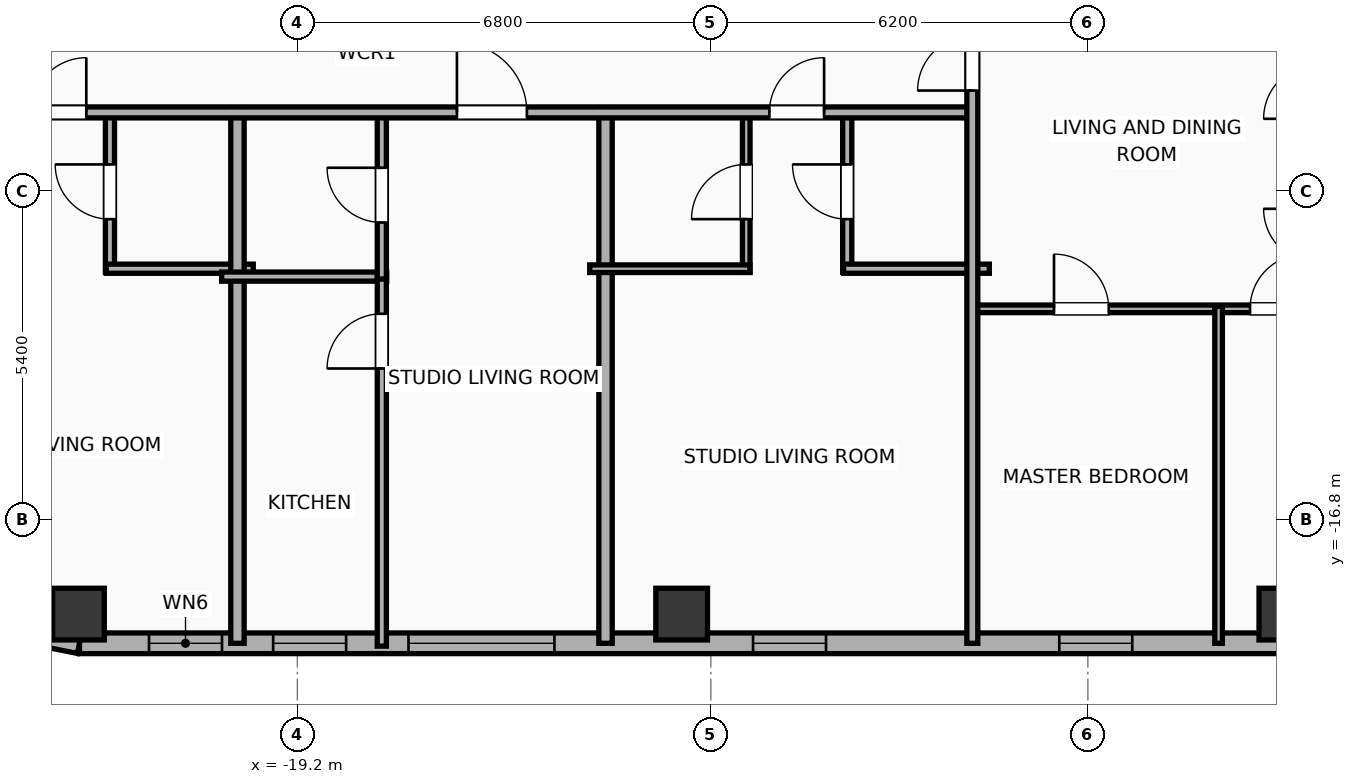
"""IFC4 building model, lengths in metres.
Left out: names, types, materials, properties, quantities, classifications, styles, units other than length and angle.
Written with IfcOpenShell. Run it as: python <this file> out.ifc"""

import sys

from ifc_helpers import new_model, si_unit, direction, frame, frame_2d, origin, origin_2d, place, context, subcontext, project, spatial, rectangle, hollow_rectangle, extrude, element, fill, save


model = new_model("IFC4")
c1 = context("Model", 3, precision=1e-05, world=origin(), true_north=direction((0.0, 1.0)))
c2 = subcontext(c1, "Body", "Model", "MODEL_VIEW")
j1 = project(units=[si_unit("LENGTHUNIT", "METRE"), si_unit("PLANEANGLEUNIT", "RADIAN")], contexts=[c1])
p1 = place(None, origin())
s1 = spatial("IfcSite", under=j1, at=p1, CompositionType="ELEMENT")
p2 = place(p1, origin())
s2 = spatial("IfcBuilding", under=s1, at=p2, CompositionType="ELEMENT")
p3 = place(p2, frame((0.0, 0.0, 235.3)))
s3 = spatial("IfcBuildingStorey", under=s2, at=p3, CompositionType="ELEMENT", Elevation=235.3)
for number, where, z_axis, x_axis in (
    (1, (-22.8, -18.35, 0.0), (0.0, 0.0, 1.0), (1.0, 0.0, 0.0)),
    (2, (-12.88, -18.35, 0.0), (0.0, 0.0, 1.0), (1.0, 0.0, 0.0)),
    (3, (-2.96, -18.35, 0.0), (0.0, 0.0, 1.0), (1.0, 0.0, 0.0)),
):
    element("IfcColumn", number, at=place(p3, frame(where, z_axis=z_axis, x_axis=x_axis)), inside=s3, PredefinedType="COLUMN", context=c2, shape_type="SweptSolid", body=[
        extrude(hollow_rectangle(XDim=0.85, YDim=0.85, WallThickness=0.028, at=origin_2d()), origin(), (0.0, 0.0, 1.0), 3.9),
    ])
p4 = place(p3, frame((26.783, -18.83, 0.0), z_axis=(0.0, 0.0, 1.0), x_axis=(-1.0, 0.0, 0.0)))
e4 = element("IfcWall", 4, at=p4, inside=s3, PredefinedType="ELEMENTEDWALL", context=c2, shape_type="SweptSolid", body=[
    extrude(rectangle(XDim=49.566, YDim=0.34, at=frame_2d((24.783, 0.0))), origin(), (0.0, 0.0, 1.0), 3.65),
])
p5 = place(p4, frame((23.583, 0.0, 0.75)))
e5 = element("IfcOpeningElement", 5, at=p5, cuts=e4, PredefinedType="OPENING", context=c2, shape_type="SweptSolid", body=[
    extrude(rectangle(XDim=2.4, YDim=2.1, at=frame_2d((1.2, 1.05))), frame((0.0, 0.18, 0.0), z_axis=(0.0, -1.0, 0.0), x_axis=(1.0, 0.0, 0.0)), (0.0, 0.0, 1.0), 0.36),
])
p6 = place(p4, frame((41.756, 0.0, 0.75)))
e6 = element("IfcOpeningElement", 6, at=p6, cuts=e4, PredefinedType="OPENING", context=c2, shape_type="SweptSolid", body=[
    extrude(rectangle(XDim=2.4, YDim=2.1, at=frame_2d((1.2, 1.05))), frame((0.0, 0.18, 0.0), z_axis=(0.0, -1.0, 0.0), x_axis=(1.0, 0.0, 0.0)), (0.0, 0.0, 1.0), 0.36),
])
p7 = place(p4, frame((47.222, 0.0, 0.75)))
e7 = element("IfcOpeningElement", 7, at=p7, cuts=e4, PredefinedType="OPENING", context=c2, shape_type="SweptSolid", body=[
    extrude(rectangle(XDim=1.2, YDim=2.05, at=frame_2d((0.6, 1.025))), frame((0.0, 0.18, 0.0), z_axis=(0.0, -1.0, 0.0), x_axis=(1.0, 0.0, 0.0)), (0.0, 0.0, 1.0), 0.36),
])
p8 = place(p4, frame((45.181, 0.0, 0.75)))
e8 = element("IfcOpeningElement", 8, at=p8, cuts=e4, PredefinedType="OPENING", context=c2, shape_type="SweptSolid", body=[
    extrude(rectangle(XDim=1.2, YDim=2.05, at=frame_2d((0.6, 1.025))), frame((0.0, 0.18, 0.0), z_axis=(0.0, -1.0, 0.0), x_axis=(1.0, 0.0, 0.0)), (0.0, 0.0, 1.0), 0.36),
])
p9 = place(p4, frame((37.289, 0.0, 0.75)))
e9 = element("IfcOpeningElement", 9, at=p9, cuts=e4, PredefinedType="OPENING", context=c2, shape_type="SweptSolid", body=[
    extrude(rectangle(XDim=1.2, YDim=2.05, at=frame_2d((0.6, 1.025))), frame((0.0, 0.18, 0.0), z_axis=(0.0, -1.0, 0.0), x_axis=(1.0, 0.0, 0.0)), (0.0, 0.0, 1.0), 0.36),
])
p10 = place(p4, frame((15.715, 0.0, 0.75)))
e10 = element("IfcOpeningElement", 10, at=p10, cuts=e4, PredefinedType="OPENING", context=c2, shape_type="SweptSolid", body=[
    extrude(rectangle(XDim=1.2, YDim=2.05, at=frame_2d((0.6, 1.025))), frame((0.0, 0.18, 0.0), z_axis=(0.0, -1.0, 0.0), x_axis=(1.0, 0.0, 0.0)), (0.0, 0.0, 1.0), 0.36),
])
p11 = place(p4, frame((12.022, 0.0, 0.75)))
e11 = element("IfcOpeningElement", 11, at=p11, cuts=e4, PredefinedType="OPENING", context=c2, shape_type="SweptSolid", body=[
    extrude(rectangle(XDim=1.2, YDim=2.05, at=frame_2d((0.6, 1.025))), frame((0.0, 0.18, 0.0), z_axis=(0.0, -1.0, 0.0), x_axis=(1.0, 0.0, 0.0)), (0.0, 0.0, 1.0), 0.36),
])
p12 = place(p4, frame((8.01, 0.0, 0.75)))
e12 = element("IfcOpeningElement", 12, at=p12, cuts=e4, PredefinedType="OPENING", context=c2, shape_type="SweptSolid", body=[
    extrude(rectangle(XDim=1.2, YDim=2.05, at=frame_2d((0.6, 1.025))), frame((0.0, 0.18, 0.0), z_axis=(0.0, -1.0, 0.0), x_axis=(1.0, 0.0, 0.0)), (0.0, 0.0, 1.0), 0.36),
])
p13 = place(p4, frame((5.037, 0.0, 0.75)))
e13 = element("IfcOpeningElement", 13, at=p13, cuts=e4, PredefinedType="OPENING", context=c2, shape_type="SweptSolid", body=[
    extrude(rectangle(XDim=1.2, YDim=2.05, at=frame_2d((0.6, 1.025))), frame((0.0, 0.18, 0.0), z_axis=(0.0, -1.0, 0.0), x_axis=(1.0, 0.0, 0.0)), (0.0, 0.0, 1.0), 0.36),
])
p14 = place(p4, frame((1.811, 0.0, 0.75)))
e14 = element("IfcOpeningElement", 14, at=p14, cuts=e4, PredefinedType="OPENING", context=c2, shape_type="SweptSolid", body=[
    extrude(rectangle(XDim=1.2, YDim=2.05, at=frame_2d((0.6, 1.025))), frame((0.0, 0.18, 0.0), z_axis=(0.0, -1.0, 0.0), x_axis=(1.0, 0.0, 0.0)), (0.0, 0.0, 1.0), 0.36),
])
p15 = place(p4, frame((32.253, 0.0, 0.75)))
e15 = element("IfcOpeningElement", 15, at=p15, cuts=e4, PredefinedType="OPENING", context=c2, shape_type="SweptSolid", body=[
    extrude(rectangle(XDim=1.2, YDim=2.05, at=frame_2d((0.6, 1.025))), frame((0.0, 0.18, 0.0), z_axis=(0.0, -1.0, 0.0), x_axis=(1.0, 0.0, 0.0)), (0.0, 0.0, 1.0), 0.36),
])
p16 = place(p4, frame((27.853, 0.0, 0.75)))
e16 = element("IfcOpeningElement", 16, at=p16, cuts=e4, PredefinedType="OPENING", context=c2, shape_type="SweptSolid", body=[
    extrude(rectangle(XDim=1.2, YDim=2.05, at=frame_2d((0.6, 1.025))), frame((0.0, 0.18, 0.0), z_axis=(0.0, -1.0, 0.0), x_axis=(1.0, 0.0, 0.0)), (0.0, 0.0, 1.0), 0.36),
])
p17 = place(p4, frame((20.473, 0.0, 0.75)))
e17 = element("IfcOpeningElement", 17, at=p17, cuts=e4, PredefinedType="OPENING", context=c2, shape_type="SweptSolid", body=[
    extrude(rectangle(XDim=1.2, YDim=2.05, at=frame_2d((0.6, 1.025))), frame((0.0, 0.18, 0.0), z_axis=(0.0, -1.0, 0.0), x_axis=(1.0, 0.0, 0.0)), (0.0, 0.0, 1.0), 0.36),
])
p18 = place(p3, frame((-22.783, -18.83, 0.0), z_axis=(0.0, 0.0, 1.0), x_axis=(-0.980788153188, 0.195075878998, 0.0)))
e18 = element("IfcWall", 18, at=p18, inside=s3, PredefinedType="ELEMENTEDWALL", context=c2, shape_type="SweptSolid", body=[
    extrude(rectangle(XDim=1.354, YDim=0.34, at=frame_2d((0.677, 0.0))), origin(), (0.0, 0.0, 1.0), 3.65),
])
p19 = place(p3, frame((-22.282, -12.73, 0.0), z_axis=(0.0, 0.0, 1.0), x_axis=(0.0, 1.0, 0.0)))
e19 = element("IfcWall", 19, at=p19, inside=s3, PredefinedType="PLUMBINGWALL", context=c2, shape_type="SweptSolid", body=[
    extrude(rectangle(XDim=2.65, YDim=0.15, at=frame_2d((1.325, 0.0))), origin(), (0.0, 0.0, 1.0), 3.65),
])
p20 = place(p19, frame((0.875, 0.0, 0.0)))
e20 = element("IfcOpeningElement", 20, at=p20, cuts=e19, PredefinedType="OPENING", context=c2, shape_type="SweptSolid", body=[
    extrude(rectangle(XDim=0.9, YDim=2.05, at=frame_2d((0.45, 1.025))), frame((0.0, 0.085, 0.0), z_axis=(0.0, -1.0, 0.0), x_axis=(1.0, 0.0, 0.0)), (0.0, 0.0, 1.0), 0.17),
])
p21 = place(p3, frame((-22.342, -12.67, 0.0), z_axis=(0.0, 0.0, 1.0), x_axis=(1.0, 0.0, 0.0)))
e21 = element("IfcWall", 21, at=p21, inside=s3, PredefinedType="PLUMBINGWALL", context=c2, shape_type="SweptSolid", body=[
    extrude(rectangle(XDim=2.417, YDim=0.15, at=frame_2d((1.208, 0.0))), origin(), (0.0, 0.0, 1.0), 3.65),
])
p22 = place(p3, frame((-20.185, -18.83, 0.0), z_axis=(0.0, 0.0, 1.0), x_axis=(0.0, 1.0, 0.0)))
e22 = element("IfcWall", 22, at=p22, inside=s3, PredefinedType="PARTITIONING", context=c2, shape_type="SweptSolid", body=[
    extrude(rectangle(XDim=8.81, YDim=0.22, at=frame_2d((4.405, 0.0))), origin(), (0.0, 0.0, 1.0), 3.09),
])
p23 = place(p3, frame((-20.445, -12.8, 0.0), z_axis=(0.0, 0.0, 1.0), x_axis=(1.0, 0.0, 0.0)))
e23 = element("IfcWall", 23, at=p23, inside=s3, PredefinedType="PLUMBINGWALL", context=c2, shape_type="SweptSolid", body=[
    extrude(rectangle(XDim=2.714, YDim=0.15, at=frame_2d((1.357, 0.0))), origin(), (0.0, 0.0, 1.0), 3.65),
])
p24 = place(p3, frame((-17.811, -18.877, 0.0), z_axis=(0.0, 0.0, 1.0), x_axis=(0.0, 1.0, 0.0)))
e24 = element("IfcWall", 24, at=p24, inside=s3, PredefinedType="PLUMBINGWALL", context=c2, shape_type="SweptSolid", body=[
    extrude(rectangle(XDim=6.117, YDim=0.15, at=frame_2d((3.058, 0.0))), origin(), (0.0, 0.0, 1.0), 3.65),
])
p25 = place(p24, frame((4.566, 0.0, 0.0)))
e25 = element("IfcOpeningElement", 25, at=p25, cuts=e24, PredefinedType="OPENING", context=c2, shape_type="SweptSolid", body=[
    extrude(rectangle(XDim=0.9, YDim=2.05, at=frame_2d((0.45, 1.025))), frame((0.0, 0.085, 0.0), z_axis=(0.0, -1.0, 0.0), x_axis=(1.0, 0.0, 0.0)), (0.0, 0.0, 1.0), 0.17),
])
p26 = place(p3, frame((-17.811, -12.84, 0.0), z_axis=(0.0, 0.0, 1.0), x_axis=(0.0, 1.0, 0.0)))
e26 = element("IfcWall", 26, at=p26, inside=s3, PredefinedType="PLUMBINGWALL", context=c2, shape_type="SweptSolid", body=[
    extrude(rectangle(XDim=2.76, YDim=0.15, at=frame_2d((1.38, 0.0))), origin(), (0.0, 0.0, 1.0), 3.65),
])
p27 = place(p26, frame((0.93, 0.0, 0.0)))
e27 = element("IfcOpeningElement", 27, at=p27, cuts=e26, PredefinedType="OPENING", context=c2, shape_type="SweptSolid", body=[
    extrude(rectangle(XDim=0.9, YDim=2.05, at=frame_2d((0.45, 1.025))), frame((0.0, 0.085, 0.0), z_axis=(0.0, -1.0, 0.0), x_axis=(1.0, 0.0, 0.0)), (0.0, 0.0, 1.0), 0.17),
])
p28 = place(p3, frame((-14.132, -18.83, 0.0), z_axis=(0.0, 0.0, 1.0), x_axis=(0.0, 1.0, 0.0)))
e28 = element("IfcWall", 28, at=p28, inside=s3, PredefinedType="PARTITIONING", context=c2, shape_type="SweptSolid", body=[
    extrude(rectangle(XDim=8.81, YDim=0.22, at=frame_2d((4.405, 0.0))), origin(), (0.0, 0.0, 1.0), 3.65),
])
p29 = place(p3, frame((-11.818, -12.73, 0.0), z_axis=(0.0, 0.0, 1.0), x_axis=(0.0, 1.0, 0.0)))
e29 = element("IfcWall", 29, at=p29, inside=s3, PredefinedType="PARTITIONING", context=c2, shape_type="SweptSolid", body=[
    extrude(rectangle(XDim=2.65, YDim=0.125, at=frame_2d((1.325, 0.0))), origin(), (0.0, 0.0, 1.0), 3.65),
])
p30 = place(p29, frame((0.875, 0.0, 0.0)))
e30 = element("IfcOpeningElement", 30, at=p30, cuts=e29, PredefinedType="OPENING", context=c2, shape_type="SweptSolid", body=[
    extrude(rectangle(XDim=0.9, YDim=2.05, at=frame_2d((0.45, 1.025))), frame((0.0, 0.073, 0.0), z_axis=(0.0, -1.0, 0.0), x_axis=(1.0, 0.0, 0.0)), (0.0, 0.0, 1.0), 0.145),
])
p31 = place(p3, frame((-10.157, -12.73, 0.0), z_axis=(0.0, 0.0, 1.0), x_axis=(0.0, 1.0, 0.0)))
e31 = element("IfcWall", 31, at=p31, inside=s3, PredefinedType="PLUMBINGWALL", context=c2, shape_type="SweptSolid", body=[
    extrude(rectangle(XDim=2.65, YDim=0.15, at=frame_2d((1.325, 0.0))), origin(), (0.0, 0.0, 1.0), 3.65),
])
p32 = place(p31, frame((0.875, 0.0, 0.0)))
e32 = element("IfcOpeningElement", 32, at=p32, cuts=e31, PredefinedType="OPENING", context=c2, shape_type="SweptSolid", body=[
    extrude(rectangle(XDim=0.9, YDim=2.05, at=frame_2d((0.45, 1.025))), frame((0.0, 0.085, 0.0), z_axis=(0.0, -1.0, 0.0), x_axis=(1.0, 0.0, 0.0)), (0.0, 0.0, 1.0), 0.17),
])
p33 = place(p3, frame((-14.392, -12.67, 0.0), z_axis=(0.0, 0.0, 1.0), x_axis=(1.0, 0.0, 0.0)))
e33 = element("IfcWall", 33, at=p33, inside=s3, PredefinedType="PARTITIONING", context=c2, shape_type="SweptSolid", body=[
    extrude(rectangle(XDim=2.634, YDim=0.125, at=frame_2d((1.317, 0.0))), origin(), (0.0, 0.0, 1.0), 3.65),
])
p34 = place(p3, frame((-10.217, -12.67, 0.0), z_axis=(0.0, 0.0, 1.0), x_axis=(1.0, 0.0, 0.0)))
e34 = element("IfcWall", 34, at=p34, inside=s3, PredefinedType="PLUMBINGWALL", context=c2, shape_type="SweptSolid", body=[
    extrude(rectangle(XDim=2.397, YDim=0.15, at=frame_2d((1.198, 0.0))), origin(), (0.0, 0.0, 1.0), 3.65),
])
p35 = place(p3, frame((-26.23, -10.1, 0.0), z_axis=(0.0, 0.0, 1.0), x_axis=(1.0, 0.0, 0.0)))
e35 = element("IfcWall", 35, at=p35, inside=s3, PredefinedType="PARTITIONING", context=c2, shape_type="SweptSolid", body=[
    extrude(rectangle(XDim=18.15, YDim=0.18, at=frame_2d((9.075, 0.0))), origin(), (0.0, 0.0, 1.0), 3.65),
])
p36 = place(p35, frame((2.659, 0.0, 0.0)))
e36 = element("IfcOpeningElement", 36, at=p36, cuts=e35, PredefinedType="OPENING", context=c2, shape_type="SweptSolid", body=[
    extrude(rectangle(XDim=0.9, YDim=2.05, at=frame_2d((0.45, 1.025))), frame((0.0, 0.1, 0.0), z_axis=(0.0, -1.0, 0.0), x_axis=(1.0, 0.0, 0.0)), (0.0, 0.0, 1.0), 0.2),
])
p37 = place(p35, frame((9.654, 0.0, 0.0)))
e37 = element("IfcOpeningElement", 37, at=p37, cuts=e35, PredefinedType="OPENING", context=c2, shape_type="SweptSolid", body=[
    extrude(rectangle(XDim=1.15, YDim=2.05, at=frame_2d((0.575, 1.025))), frame((0.0, 0.1, 0.0), z_axis=(0.0, -1.0, 0.0), x_axis=(1.0, 0.0, 0.0)), (0.0, 0.0, 1.0), 0.2),
])
p38 = place(p35, frame((14.792, 0.0, 0.0)))
e38 = element("IfcOpeningElement", 38, at=p38, cuts=e35, PredefinedType="OPENING", context=c2, shape_type="SweptSolid", body=[
    extrude(rectangle(XDim=0.9, YDim=2.05, at=frame_2d((0.45, 1.025))), frame((0.0, 0.1, 0.0), z_axis=(0.0, -1.0, 0.0), x_axis=(1.0, 0.0, 0.0)), (0.0, 0.0, 1.0), 0.2),
])
p39 = place(p3, frame((-8.08, -13.33, 0.0), z_axis=(0.0, 0.0, 1.0), x_axis=(1.0, 0.0, 0.0)))
e39 = element("IfcWall", 39, at=p39, inside=s3, PredefinedType="PARTITIONING", context=c2, shape_type="SweptSolid", body=[
    extrude(rectangle(XDim=8.06, YDim=0.125, at=frame_2d((4.03, 0.0))), origin(), (0.0, 0.0, 1.0), 3.65),
])
p40 = place(p39, frame((1.323, 0.0, 0.0)))
e40 = element("IfcOpeningElement", 40, at=p40, cuts=e39, PredefinedType="OPENING", context=c2, shape_type="SweptSolid", body=[
    extrude(rectangle(XDim=0.9, YDim=2.05, at=frame_2d((0.45, 1.025))), frame((0.0, 0.073, 0.0), z_axis=(0.0, -1.0, 0.0), x_axis=(1.0, 0.0, 0.0)), (0.0, 0.0, 1.0), 0.145),
])
p41 = place(p39, frame((4.547, 0.0, 0.0)))
e41 = element("IfcOpeningElement", 41, at=p41, cuts=e39, PredefinedType="OPENING", context=c2, shape_type="SweptSolid", body=[
    extrude(rectangle(XDim=0.9, YDim=2.05, at=frame_2d((0.45, 1.025))), frame((0.0, 0.073, 0.0), z_axis=(0.0, -1.0, 0.0), x_axis=(1.0, 0.0, 0.0)), (0.0, 0.0, 1.0), 0.145),
])
p42 = place(p3, frame((-4.05, -18.83, 0.0), z_axis=(0.0, 0.0, 1.0), x_axis=(0.0, 1.0, 0.0)))
e42 = element("IfcWall", 42, at=p42, inside=s3, PredefinedType="PARTITIONING", context=c2, shape_type="SweptSolid", body=[
    extrude(rectangle(XDim=5.54, YDim=0.125, at=frame_2d((2.77, 0.0))), origin(), (0.0, 0.0, 1.0), 3.65),
])
p43 = place(p3, frame((-8.1, -18.83, 0.0), z_axis=(0.0, 0.0, 1.0), x_axis=(0.0, 1.0, 0.0)))
e43 = element("IfcWall", 43, at=p43, inside=s3, PredefinedType="PARTITIONING", context=c2, shape_type="SweptSolid", body=[
    extrude(rectangle(XDim=10.34, YDim=0.18, at=frame_2d((5.17, 0.0))), origin(), (0.0, 0.0, 1.0), 3.65),
])
p44 = place(p43, frame((9.09, 0.0, 0.0)))
e44 = element("IfcOpeningElement", 44, at=p44, cuts=e43, PredefinedType="OPENING", context=c2, shape_type="SweptSolid", body=[
    extrude(rectangle(XDim=0.9, YDim=2.05, at=frame_2d((0.45, 1.025))), frame((0.0, 0.1, 0.0), z_axis=(0.0, -1.0, 0.0), x_axis=(1.0, 0.0, 0.0)), (0.0, 0.0, 1.0), 0.2),
])
p45 = place(p6, origin())
e45 = element("IfcWindow", 45, at=p45, inside=s3, PartitioningType="SINGLE_PANEL", PredefinedType="WINDOW", context=c2, shape_type="SweptSolid", body=[
    extrude(rectangle(XDim=2.4, YDim=2.1, at=frame_2d((1.2, 1.05))), frame((0.0, 0.03, 0.0), z_axis=(0.0, -1.0, 0.0), x_axis=(1.0, 0.0, 0.0)), (0.0, 0.0, 1.0), 0.06),
])
fill(e6, e45)
p46 = place(p7, origin())
e46 = element("IfcWindow", 46, at=p46, inside=s3, PartitioningType="SINGLE_PANEL", PredefinedType="WINDOW", context=c2, shape_type="SweptSolid", body=[
    extrude(rectangle(XDim=1.2, YDim=2.05, at=frame_2d((0.6, 1.025))), frame((0.0, 0.03, 0.0), z_axis=(0.0, -1.0, 0.0), x_axis=(1.0, 0.0, 0.0)), (0.0, 0.0, 1.0), 0.06),
])
fill(e7, e46)
p47 = place(p8, origin())
e47 = element("IfcWindow", 47, at=p47, inside=s3, PartitioningType="SINGLE_PANEL", PredefinedType="WINDOW", context=c2, shape_type="SweptSolid", body=[
    extrude(rectangle(XDim=1.2, YDim=2.05, at=frame_2d((0.6, 1.025))), frame((0.0, 0.03, 0.0), z_axis=(0.0, -1.0, 0.0), x_axis=(1.0, 0.0, 0.0)), (0.0, 0.0, 1.0), 0.06),
])
fill(e8, e47)
p48 = place(p9, origin())
e48 = element("IfcWindow", 48, at=p48, inside=s3, PartitioningType="SINGLE_PANEL", PredefinedType="WINDOW", context=c2, shape_type="SweptSolid", body=[
    extrude(rectangle(XDim=1.2, YDim=2.05, at=frame_2d((0.6, 1.025))), frame((0.0, 0.03, 0.0), z_axis=(0.0, -1.0, 0.0), x_axis=(1.0, 0.0, 0.0)), (0.0, 0.0, 1.0), 0.06),
])
fill(e9, e48)
p49 = place(p15, origin())
e49 = element("IfcWindow", 49, at=p49, inside=s3, PartitioningType="SINGLE_PANEL", PredefinedType="WINDOW", context=c2, shape_type="SweptSolid", body=[
    extrude(rectangle(XDim=1.2, YDim=2.05, at=frame_2d((0.6, 1.025))), frame((0.0, 0.03, 0.0), z_axis=(0.0, -1.0, 0.0), x_axis=(1.0, 0.0, 0.0)), (0.0, 0.0, 1.0), 0.06),
])
fill(e15, e49)
p50 = place(p20, origin())
e50 = element("IfcDoor", 50, at=p50, inside=s3, OperationType="SINGLE_SWING_RIGHT", PredefinedType="DOOR", context=c2, shape_type="SweptSolid", body=[
    extrude(rectangle(XDim=0.9, YDim=2.05, at=frame_2d((0.45, 1.025))), frame((0.0, 0.025, 0.0), z_axis=(0.0, -1.0, 0.0), x_axis=(1.0, 0.0, 0.0)), (0.0, 0.0, 1.0), 0.05),
])
fill(e20, e50)
p51 = place(p25, origin())
e51 = element("IfcDoor", 51, at=p51, inside=s3, OperationType="SINGLE_SWING_LEFT", PredefinedType="DOOR", context=c2, shape_type="SweptSolid", body=[
    extrude(rectangle(XDim=0.9, YDim=2.05, at=frame_2d((0.45, 1.025))), frame((0.0, 0.025, 0.0), z_axis=(0.0, -1.0, 0.0), x_axis=(1.0, 0.0, 0.0)), (0.0, 0.0, 1.0), 0.05),
])
fill(e25, e51)
p52 = place(p27, origin())
e52 = element("IfcDoor", 52, at=p52, inside=s3, OperationType="SINGLE_SWING_RIGHT", PredefinedType="DOOR", context=c2, shape_type="SweptSolid", body=[
    extrude(rectangle(XDim=0.9, YDim=2.05, at=frame_2d((0.45, 1.025))), frame((0.0, 0.025, 0.0), z_axis=(0.0, -1.0, 0.0), x_axis=(1.0, 0.0, 0.0)), (0.0, 0.0, 1.0), 0.05),
])
fill(e27, e52)
p53 = place(p30, origin())
e53 = element("IfcDoor", 53, at=p53, inside=s3, OperationType="SINGLE_SWING_LEFT", PredefinedType="DOOR", context=c2, shape_type="SweptSolid", body=[
    extrude(rectangle(XDim=0.9, YDim=2.05, at=frame_2d((0.45, 1.025))), frame((0.0, 0.025, 0.0), z_axis=(0.0, -1.0, 0.0), x_axis=(1.0, 0.0, 0.0)), (0.0, 0.0, 1.0), 0.05),
])
fill(e30, e53)
p54 = place(p32, origin())
e54 = element("IfcDoor", 54, at=p54, inside=s3, OperationType="SINGLE_SWING_RIGHT", PredefinedType="DOOR", context=c2, shape_type="SweptSolid", body=[
    extrude(rectangle(XDim=0.9, YDim=2.05, at=frame_2d((0.45, 1.025))), frame((0.0, 0.025, 0.0), z_axis=(0.0, -1.0, 0.0), x_axis=(1.0, 0.0, 0.0)), (0.0, 0.0, 1.0), 0.05),
])
fill(e32, e54)
p55 = place(p36, origin())
e55 = element("IfcDoor", 55, at=p55, inside=s3, OperationType="SINGLE_SWING_RIGHT", PredefinedType="DOOR", context=c2, shape_type="SweptSolid", body=[
    extrude(rectangle(XDim=0.9, YDim=2.05, at=frame_2d((0.45, 1.025))), frame((0.0, 0.025, 0.0), z_axis=(0.0, -1.0, 0.0), x_axis=(1.0, 0.0, 0.0)), (0.0, 0.0, 1.0), 0.05),
])
fill(e36, e55)
p56 = place(p37, origin())
e56 = element("IfcDoor", 56, at=p56, inside=s3, OperationType="SINGLE_SWING_LEFT", PredefinedType="DOOR", context=c2, shape_type="SweptSolid", body=[
    extrude(rectangle(XDim=1.15, YDim=2.05, at=frame_2d((0.575, 1.025))), frame((0.0, 0.025, 0.0), z_axis=(0.0, -1.0, 0.0), x_axis=(1.0, 0.0, 0.0)), (0.0, 0.0, 1.0), 0.05),
])
fill(e37, e56)
p57 = place(p38, origin())
e57 = element("IfcDoor", 57, at=p57, inside=s3, OperationType="SINGLE_SWING_RIGHT", PredefinedType="DOOR", context=c2, shape_type="SweptSolid", body=[
    extrude(rectangle(XDim=0.9, YDim=2.05, at=frame_2d((0.45, 1.025))), frame((0.0, 0.025, 0.0), z_axis=(0.0, -1.0, 0.0), x_axis=(1.0, 0.0, 0.0)), (0.0, 0.0, 1.0), 0.05),
])
fill(e38, e57)
p58 = place(p40, origin())
e58 = element("IfcDoor", 58, at=p58, inside=s3, OperationType="SINGLE_SWING_LEFT", PredefinedType="DOOR", context=c2, shape_type="SweptSolid", body=[
    extrude(rectangle(XDim=0.9, YDim=2.05, at=frame_2d((0.45, 1.025))), frame((0.0, 0.025, 0.0), z_axis=(0.0, -1.0, 0.0), x_axis=(1.0, 0.0, 0.0)), (0.0, 0.0, 1.0), 0.05),
])
fill(e40, e58)
p59 = place(p41, origin())
e59 = element("IfcDoor", 59, at=p59, inside=s3, OperationType="SINGLE_SWING_RIGHT", PredefinedType="DOOR", context=c2, shape_type="SweptSolid", body=[
    extrude(rectangle(XDim=0.9, YDim=2.05, at=frame_2d((0.45, 1.025))), frame((0.0, 0.025, 0.0), z_axis=(0.0, -1.0, 0.0), x_axis=(1.0, 0.0, 0.0)), (0.0, 0.0, 1.0), 0.05),
])
fill(e41, e59)
p60 = place(p44, origin())
e60 = element("IfcDoor", 60, at=p60, inside=s3, OperationType="SINGLE_SWING_LEFT", PredefinedType="DOOR", context=c2, shape_type="SweptSolid", body=[
    extrude(rectangle(XDim=0.9, YDim=2.05, at=frame_2d((0.45, 1.025))), frame((0.0, 0.025, 0.0), z_axis=(0.0, -1.0, 0.0), x_axis=(1.0, 0.0, 0.0)), (0.0, 0.0, 1.0), 0.05),
])
fill(e44, e60)
save(model, sys.argv[1])
